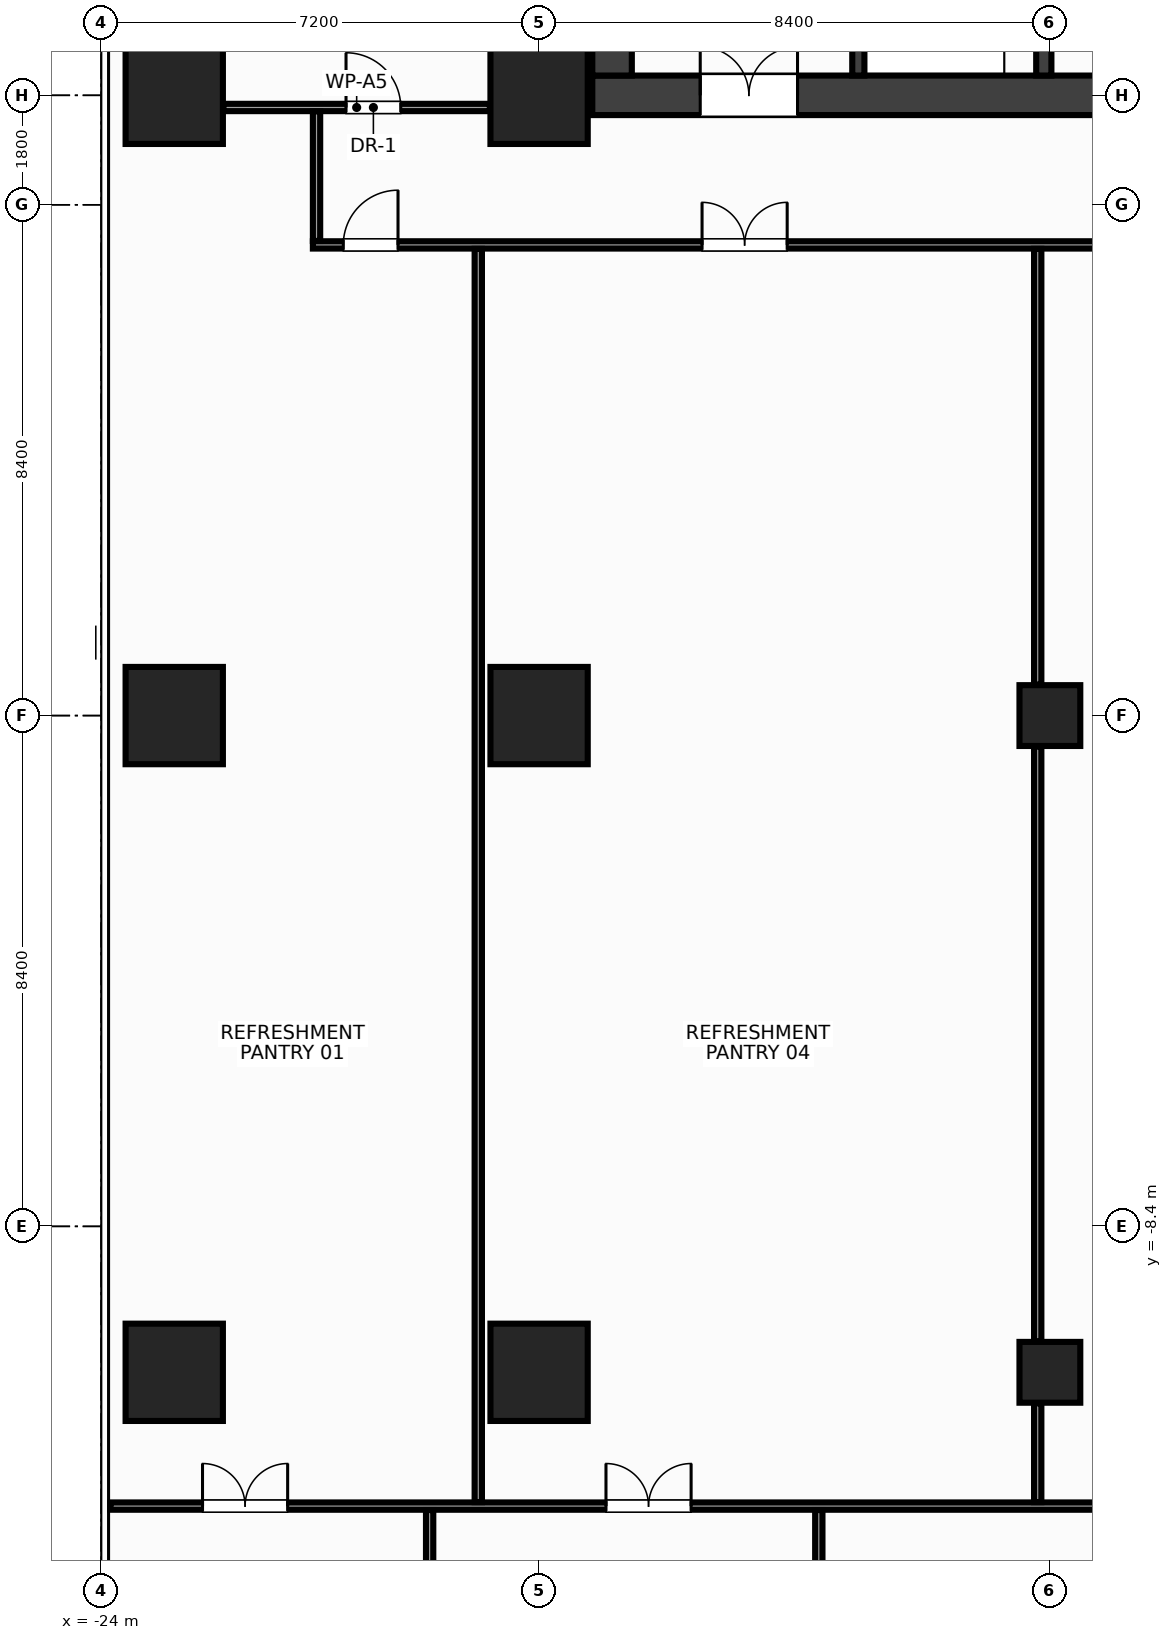
"""IFC4 building model, lengths in metres.
Left out: names, types, materials, properties, quantities, classifications, styles, units other than length and angle.
Written with IfcOpenShell. Run it as: python <this file> out.ifc"""

import sys

from ifc_helpers import new_model, si_unit, direction, frame, frame_2d, origin, origin_2d, place, context, subcontext, project, spatial, rectangle, hollow_rectangle, extrude, source, transform, mapped, element, fill, save


model = new_model("IFC4")
c1 = context("Model", 3, precision=1e-05, world=origin(), true_north=direction((0.0, 1.0)))
c2 = subcontext(c1, "Body", "Model", "MODEL_VIEW")
j1 = project(units=[si_unit("LENGTHUNIT", "METRE"), si_unit("PLANEANGLEUNIT", "RADIAN")], contexts=[c1])
p1 = place(None, origin())
s1 = spatial("IfcSite", under=j1, at=p1, CompositionType="ELEMENT")
p2 = place(p1, origin())
s2 = spatial("IfcBuilding", under=s1, at=p2, CompositionType="ELEMENT")
p3 = place(p2, frame((0.0, 0.0, 178.4)))
s3 = spatial("IfcBuildingStorey", under=s2, at=p3, CompositionType="ELEMENT", Elevation=178.4)
m1 = source(origin(), c2, "Body", "SweptSolid", [
    extrude(rectangle(XDim=31.85, YDim=0.65, at=frame_2d((15.925, 0.0))), origin(), (0.0, 0.0, 1.0), 3.6),
])
p4 = place(p3, frame((-15.925, 10.2, 0.0), z_axis=(0.0, 0.0, 1.0), x_axis=(1.0, 0.0, 0.0)))
e1 = element("IfcWall", 1, at=p4, inside=s3, PredefinedType="SHEAR", context=c2, shape_type="MappedRepresentation", body=[
    mapped(m1, transform((0.0, 0.0, 0.0), x_axis=(1.0, 0.0, 0.0), y_axis=(0.0, 1.0, 0.0), z_axis=(0.0, 0.0, 1.0), scale=1.0)),
])
p5 = place(p4, frame((1.775, 0.0, 0.0)))
e2 = element("IfcOpeningElement", 2, at=p5, cuts=e1, PredefinedType="OPENING", context=c2, shape_type="SweptSolid", body=[
    extrude(rectangle(XDim=1.6, YDim=2.15, at=frame_2d((0.8, 1.075))), frame((0.0, 0.337, 0.0), z_axis=(0.0, -1.0, 0.0), x_axis=(1.0, 0.0, 0.0)), (0.0, 0.0, 1.0), 0.674),
])
p6 = place(p4, frame((28.475, 0.0, 0.0)))
e3 = element("IfcOpeningElement", 3, at=p6, cuts=e1, PredefinedType="OPENING", context=c2, shape_type="SweptSolid", body=[
    extrude(rectangle(XDim=1.6, YDim=2.15, at=frame_2d((0.8, 1.075))), frame((0.0, 0.337, 0.0), z_axis=(0.0, -1.0, 0.0), x_axis=(1.0, 0.0, 0.0)), (0.0, 0.0, 1.0), 0.674),
])
p7 = place(p4, frame((15.175, 0.0, 0.0)))
e4 = element("IfcOpeningElement", 4, at=p7, cuts=e1, PredefinedType="OPENING", context=c2, shape_type="SweptSolid", body=[
    extrude(rectangle(XDim=1.5, YDim=2.2, at=frame_2d((0.75, 1.1))), frame((0.0, 0.337, 0.0), z_axis=(0.0, -1.0, 0.0), x_axis=(1.0, 0.0, 0.0)), (0.0, 0.0, 1.0), 0.674),
])
m2 = source(origin(), c2, "Body", "SweptSolid", [
    extrude(rectangle(XDim=12.95, YDim=0.65, at=frame_2d((6.475, 0.0))), origin(), (0.0, 0.0, 1.0), 3.6),
])
p8 = place(p3, frame((-15.6, 10.525, 0.0), z_axis=(0.0, 0.0, 1.0), x_axis=(0.0, 1.0, 0.0)))
e5 = element("IfcWall", 5, at=p8, inside=s3, PredefinedType="SHEAR", context=c2, shape_type="MappedRepresentation", body=[
    mapped(m2, transform((0.0, 0.0, 0.0), x_axis=(1.0, 0.0, 0.0), y_axis=(0.0, 1.0, 0.0), z_axis=(0.0, 0.0, 1.0), scale=1.0)),
])
m3 = source(origin(), c2, "Body", "SweptSolid", [
    extrude(rectangle(XDim=12.95, YDim=0.25, at=frame_2d((6.475, 0.0))), origin(), (0.0, 0.0, 1.0), 3.6),
])
p9 = place(p3, frame((-8.5, 10.525, 0.0), z_axis=(0.0, 0.0, 1.0), x_axis=(0.0, 1.0, 0.0)))
e6 = element("IfcWall", 6, at=p9, inside=s3, PredefinedType="SHEAR", context=c2, shape_type="MappedRepresentation", body=[
    mapped(m3, transform((0.0, 0.0, 0.0), x_axis=(1.0, 0.0, 0.0), y_axis=(0.0, 1.0, 0.0), z_axis=(0.0, 0.0, 1.0), scale=1.0)),
])
p10 = place(p9, frame((4.145, 0.0, 0.0)))
e7 = element("IfcOpeningElement", 7, at=p10, cuts=e6, PredefinedType="OPENING", context=c2, shape_type="SweptSolid", body=[
    extrude(rectangle(XDim=1.1, YDim=2.15, at=frame_2d((0.55, 1.075))), frame((0.0, 0.137, 0.0), z_axis=(0.0, -1.0, 0.0), x_axis=(1.0, 0.0, 0.0)), (0.0, 0.0, 1.0), 0.274),
])
p11 = place(p9, frame((6.065, 0.0, 0.0)))
e8 = element("IfcOpeningElement", 8, at=p11, cuts=e6, PredefinedType="OPENING", context=c2, shape_type="SweptSolid", body=[
    extrude(rectangle(XDim=1.1, YDim=2.15, at=frame_2d((0.55, 1.075))), frame((0.0, 0.137, 0.0), z_axis=(0.0, -1.0, 0.0), x_axis=(1.0, 0.0, 0.0)), (0.0, 0.0, 1.0), 0.274),
])
p12 = place(p9, frame((7.985, 0.0, 0.0)))
e9 = element("IfcOpeningElement", 9, at=p12, cuts=e6, PredefinedType="OPENING", context=c2, shape_type="SweptSolid", body=[
    extrude(rectangle(XDim=1.1, YDim=2.15, at=frame_2d((0.55, 1.075))), frame((0.0, 0.137, 0.0), z_axis=(0.0, -1.0, 0.0), x_axis=(1.0, 0.0, 0.0)), (0.0, 0.0, 1.0), 0.274),
])
m4 = source(origin(), c2, "Body", "SweptSolid", [
    extrude(rectangle(XDim=3.125, YDim=0.2, at=frame_2d((1.562, 0.0))), origin(), (0.0, 0.0, 1.0), 3.6),
])
p13 = place(p3, frame((-11.55, 10.525, 0.0), z_axis=(0.0, 0.0, 1.0), x_axis=(0.0, 1.0, 0.0)))
e10 = element("IfcWall", 10, at=p13, inside=s3, PredefinedType="SHEAR", context=c2, shape_type="MappedRepresentation", body=[
    mapped(m4, transform((0.0, 0.0, 0.0), x_axis=(1.0, 0.0, 0.0), y_axis=(0.0, 1.0, 0.0), z_axis=(0.0, 0.0, 1.0), scale=1.0)),
])
p14 = place(p13, frame((0.9, 0.0, 0.0)))
e11 = element("IfcOpeningElement", 11, at=p14, cuts=e10, PredefinedType="OPENING", context=c2, shape_type="SweptSolid", body=[
    extrude(rectangle(XDim=1.1, YDim=2.15, at=frame_2d((0.55, 1.075))), frame((0.0, 0.112, 0.0), z_axis=(0.0, -1.0, 0.0), x_axis=(1.0, 0.0, 0.0)), (0.0, 0.0, 1.0), 0.224),
])
m5 = source(origin(), c2, "Body", "SweptSolid", [
    extrude(rectangle(XDim=1.6, YDim=1.6, at=origin_2d()), origin(), (0.0, 0.0, 1.0), 3.6),
])
for number, where, z_axis, x_axis in (
    (12, (-16.8, -10.8, 0.0), (0.0, 0.0, 1.0), (1.0, 0.0, 0.0)),
    (13, (-16.8, 0.0, 0.0), (0.0, 0.0, 1.0), (1.0, 0.0, 0.0)),
    (14, (-16.8, 10.2, 0.0), (0.0, 0.0, 1.0), (1.0, 0.0, 0.0)),
    (15, (-22.8, -10.8, 0.0), (0.0, 0.0, 1.0), (1.0, 0.0, 0.0)),
    (16, (-22.8, 0.0, 0.0), (0.0, 0.0, 1.0), (1.0, 0.0, 0.0)),
    (17, (-22.8, 10.2, 0.0), (0.0, 0.0, 1.0), (1.0, 0.0, 0.0)),
):
    element("IfcColumn", number, at=place(p3, frame(where, z_axis=z_axis, x_axis=x_axis)), inside=s3, PredefinedType="COLUMN", context=c2, shape_type="MappedRepresentation", body=[
        mapped(m5, transform((0.0, 0.0, 0.0), x_axis=(1.0, 0.0, 0.0), y_axis=(0.0, 1.0, 0.0), z_axis=(0.0, 0.0, 1.0), scale=1.0)),
    ])
m6 = source(origin(), c2, "Body", "SweptSolid", [
    extrude(hollow_rectangle(XDim=1.0, YDim=1.0, WallThickness=0.045, at=origin_2d()), origin(), (0.0, 0.0, 1.0), 3.6),
])
for number, where, z_axis, x_axis in (
    (18, (-8.4, 0.0, 0.0), (0.0, 0.0, 1.0), (1.0, 0.0, 0.0)),
    (19, (-8.4, -10.8, 0.0), (0.0, 0.0, 1.0), (1.0, 0.0, 0.0)),
):
    element("IfcColumn", number, at=place(p3, frame(where, z_axis=z_axis, x_axis=x_axis)), inside=s3, PredefinedType="COLUMN", context=c2, shape_type="MappedRepresentation", body=[
        mapped(m6, transform((0.0, 0.0, 0.0), x_axis=(1.0, 0.0, 0.0), y_axis=(0.0, 1.0, 0.0), z_axis=(0.0, 0.0, 1.0), scale=1.0)),
    ])
m7 = source(origin(), c2, "Body", "SweptSolid", [
    extrude(rectangle(XDim=4.38, YDim=0.12, at=frame_2d((2.19, 0.0))), origin(), (0.0, 0.0, 1.0), 2.915),
])
p15 = place(p3, frame((-21.99, 10.0, 0.0), z_axis=(0.0, 0.0, 1.0), x_axis=(1.0, 0.0, 0.0)))
e20 = element("IfcWall", 20, at=p15, inside=s3, PredefinedType="PARTITIONING", context=c2, shape_type="MappedRepresentation", body=[
    mapped(m7, transform((0.0, 0.0, 0.0), x_axis=(1.0, 0.0, 0.0), y_axis=(0.0, 1.0, 0.0), z_axis=(0.0, 0.0, 1.0), scale=1.0)),
])
p16 = place(p15, frame((2.015, 0.0, 0.0)))
e21 = element("IfcOpeningElement", 21, at=p16, cuts=e20, PredefinedType="OPENING", context=c2, shape_type="SweptSolid", body=[
    extrude(rectangle(XDim=0.9, YDim=2.15, at=frame_2d((0.45, 1.075))), frame((0.0, 0.072, 0.0), z_axis=(0.0, -1.0, 0.0), x_axis=(1.0, 0.0, 0.0)), (0.0, 0.0, 1.0), 0.144),
])
m8 = source(origin(), c2, "Body", "SweptSolid", [
    extrude(rectangle(XDim=31.6, YDim=0.12, at=frame_2d((15.8, 0.0))), origin(), (0.0, 0.0, 1.0), 2.765),
])
p17 = place(p3, frame((-20.52, 7.74, 0.0), z_axis=(0.0, 0.0, 1.0), x_axis=(1.0, 0.0, 0.0)))
e22 = element("IfcWall", 22, at=p17, inside=s3, PredefinedType="PARTITIONING", context=c2, shape_type="MappedRepresentation", body=[
    mapped(m8, transform((0.0, 0.0, 0.0), x_axis=(1.0, 0.0, 0.0), y_axis=(0.0, 1.0, 0.0), z_axis=(0.0, 0.0, 1.0), scale=1.0)),
])
p18 = place(p17, frame((0.5, 0.0, 0.0)))
e23 = element("IfcOpeningElement", 23, at=p18, cuts=e22, PredefinedType="OPENING", context=c2, shape_type="SweptSolid", body=[
    extrude(rectangle(XDim=0.9, YDim=2.15, at=frame_2d((0.45, 1.075))), frame((0.0, 0.072, 0.0), z_axis=(0.0, -1.0, 0.0), x_axis=(1.0, 0.0, 0.0)), (0.0, 0.0, 1.0), 0.144),
])
p19 = place(p17, frame((6.4, 0.0, 0.0)))
e24 = element("IfcOpeningElement", 24, at=p19, cuts=e22, PredefinedType="OPENING", context=c2, shape_type="SweptSolid", body=[
    extrude(rectangle(XDim=1.4, YDim=2.2, at=frame_2d((0.7, 1.1))), frame((0.0, 0.072, 0.0), z_axis=(0.0, -1.0, 0.0), x_axis=(1.0, 0.0, 0.0)), (0.0, 0.0, 1.0), 0.144),
])
p20 = place(p17, frame((15.52, 0.0, 0.0)))
e25 = element("IfcOpeningElement", 25, at=p20, cuts=e22, PredefinedType="OPENING", context=c2, shape_type="SweptSolid", body=[
    extrude(rectangle(XDim=1.4, YDim=2.2, at=frame_2d((0.7, 1.1))), frame((0.0, 0.072, 0.0), z_axis=(0.0, -1.0, 0.0), x_axis=(1.0, 0.0, 0.0)), (0.0, 0.0, 1.0), 0.144),
])
p21 = place(p17, frame((24.12, 0.0, 0.0)))
e26 = element("IfcOpeningElement", 26, at=p21, cuts=e22, PredefinedType="OPENING", context=c2, shape_type="SweptSolid", body=[
    extrude(rectangle(XDim=1.4, YDim=2.2, at=frame_2d((0.7, 1.1))), frame((0.0, 0.072, 0.0), z_axis=(0.0, -1.0, 0.0), x_axis=(1.0, 0.0, 0.0)), (0.0, 0.0, 1.0), 0.144),
])
p22 = place(p17, frame((29.63, 0.0, 0.0)))
e27 = element("IfcOpeningElement", 27, at=p22, cuts=e22, PredefinedType="OPENING", context=c2, shape_type="SweptSolid", body=[
    extrude(rectangle(XDim=1.4, YDim=2.2, at=frame_2d((0.7, 1.1))), frame((0.0, 0.072, 0.0), z_axis=(0.0, -1.0, 0.0), x_axis=(1.0, 0.0, 0.0)), (0.0, 0.0, 1.0), 0.144),
])
m9 = source(origin(), c2, "Body", "SweptSolid", [
    extrude(rectangle(XDim=2.13, YDim=0.12, at=frame_2d((1.065, 0.0))), origin(), (0.0, 0.0, 1.0), 3.38),
])
p23 = place(p3, frame((-20.46, 7.805, 0.0), z_axis=(0.0, 0.0, 1.0), x_axis=(0.0, 1.0, 0.0)))
e28 = element("IfcWall", 28, at=p23, inside=s3, PredefinedType="PARTITIONING", context=c2, shape_type="MappedRepresentation", body=[
    mapped(m9, transform((0.0, 0.0, 0.0), x_axis=(1.0, 0.0, 0.0), y_axis=(0.0, 1.0, 0.0), z_axis=(0.0, 0.0, 1.0), scale=1.0)),
])
m10 = source(origin(), c2, "Body", "SweptSolid", [
    extrude(rectangle(XDim=34.925, YDim=0.12, at=frame_2d((17.462, 0.0))), origin(), (0.0, 0.0, 1.0), 2.965),
])
p24 = place(p3, frame((-23.85, -13.0, 0.0), z_axis=(0.0, 0.0, 1.0), x_axis=(1.0, 0.0, 0.0)))
e29 = element("IfcWall", 29, at=p24, inside=s3, PredefinedType="PARTITIONING", context=c2, shape_type="MappedRepresentation", body=[
    mapped(m10, transform((0.0, 0.0, 0.0), x_axis=(1.0, 0.0, 0.0), y_axis=(0.0, 1.0, 0.0), z_axis=(0.0, 0.0, 1.0), scale=1.0)),
])
p25 = place(p24, frame((1.515, 0.0, 0.0)))
e30 = element("IfcOpeningElement", 30, at=p25, cuts=e29, PredefinedType="OPENING", context=c2, shape_type="SweptSolid", body=[
    extrude(rectangle(XDim=1.4, YDim=2.2, at=frame_2d((0.7, 1.1))), frame((0.0, 0.072, 0.0), z_axis=(0.0, -1.0, 0.0), x_axis=(1.0, 0.0, 0.0)), (0.0, 0.0, 1.0), 0.144),
])
p26 = place(p24, frame((8.15, 0.0, 0.0)))
e31 = element("IfcOpeningElement", 31, at=p26, cuts=e29, PredefinedType="OPENING", context=c2, shape_type="SweptSolid", body=[
    extrude(rectangle(XDim=1.4, YDim=2.2, at=frame_2d((0.7, 1.1))), frame((0.0, 0.072, 0.0), z_axis=(0.0, -1.0, 0.0), x_axis=(1.0, 0.0, 0.0)), (0.0, 0.0, 1.0), 0.144),
])
m11 = source(origin(), c2, "Body", "SweptSolid", [
    extrude(rectangle(XDim=20.61, YDim=0.12, at=frame_2d((10.305, 0.0))), origin(), (0.0, 0.0, 1.0), 2.915),
])
p27 = place(p3, frame((-17.8, -12.935, 0.0), z_axis=(0.0, 0.0, 1.0), x_axis=(0.0, 1.0, 0.0)))
e32 = element("IfcWall", 32, at=p27, inside=s3, PredefinedType="PARTITIONING", context=c2, shape_type="MappedRepresentation", body=[
    mapped(m11, transform((0.0, 0.0, 0.0), x_axis=(1.0, 0.0, 0.0), y_axis=(0.0, 1.0, 0.0), z_axis=(0.0, 0.0, 1.0), scale=1.0)),
])
m12 = source(origin(), c2, "Body", "SweptSolid", [
    extrude(rectangle(XDim=1.625, YDim=0.12, at=frame_2d((0.812, 0.0))), origin(), (0.0, 0.0, 1.0), 2.965),
])
p28 = place(p3, frame((-8.6, -12.935, 0.0), z_axis=(0.0, 0.0, 1.0), x_axis=(0.0, 1.0, 0.0)))
e33 = element("IfcWall", 33, at=p28, inside=s3, PredefinedType="PARTITIONING", context=c2, shape_type="MappedRepresentation", body=[
    mapped(m12, transform((0.0, 0.0, 0.0), x_axis=(1.0, 0.0, 0.0), y_axis=(0.0, 1.0, 0.0), z_axis=(0.0, 0.0, 1.0), scale=1.0)),
])
m13 = source(origin(), c2, "Body", "SweptSolid", [
    extrude(rectangle(XDim=9.78, YDim=0.12, at=frame_2d((4.89, 0.0))), origin(), (0.0, 0.0, 1.0), 2.765),
])
p29 = place(p3, frame((-8.6, -10.29, 0.0), z_axis=(0.0, 0.0, 1.0), x_axis=(0.0, 1.0, 0.0)))
e34 = element("IfcWall", 34, at=p29, inside=s3, PredefinedType="PARTITIONING", context=c2, shape_type="MappedRepresentation", body=[
    mapped(m13, transform((0.0, 0.0, 0.0), x_axis=(1.0, 0.0, 0.0), y_axis=(0.0, 1.0, 0.0), z_axis=(0.0, 0.0, 1.0), scale=1.0)),
])
m14 = source(origin(), c2, "Body", "SweptSolid", [
    extrude(rectangle(XDim=7.165, YDim=0.12, at=frame_2d((3.583, 0.0))), origin(), (0.0, 0.0, 1.0), 2.665),
])
p30 = place(p3, frame((-8.6, 0.51, 0.0), z_axis=(0.0, 0.0, 1.0), x_axis=(0.0, 1.0, 0.0)))
e35 = element("IfcWall", 35, at=p30, inside=s3, PredefinedType="PARTITIONING", context=c2, shape_type="MappedRepresentation", body=[
    mapped(m14, transform((0.0, 0.0, 0.0), x_axis=(1.0, 0.0, 0.0), y_axis=(0.0, 1.0, 0.0), z_axis=(0.0, 0.0, 1.0), scale=1.0)),
])
m15 = source(origin(), c2, "Body", "SweptSolid", [
    extrude(rectangle(XDim=4.597, YDim=0.12, at=frame_2d((2.299, 0.0))), origin(), (0.0, 0.0, 1.0), 3.38),
])
p31 = place(p3, frame((-18.6, -17.662, 0.0), z_axis=(0.0, 0.0, 1.0), x_axis=(0.0, 1.0, 0.0)))
e36 = element("IfcWall", 36, at=p31, inside=s3, PredefinedType="PARTITIONING", context=c2, shape_type="MappedRepresentation", body=[
    mapped(m15, transform((0.0, 0.0, 0.0), x_axis=(1.0, 0.0, 0.0), y_axis=(0.0, 1.0, 0.0), z_axis=(0.0, 0.0, 1.0), scale=1.0)),
])
m16 = source(origin(), c2, "Body", "SweptSolid", [
    extrude(rectangle(XDim=9.585, YDim=0.12, at=frame_2d((4.792, 0.0))), origin(), (0.0, 0.0, 1.0), 2.915),
])
p32 = place(p3, frame((-12.2, -22.65, 0.0), z_axis=(0.0, 0.0, 1.0), x_axis=(0.0, 1.0, 0.0)))
e37 = element("IfcWall", 37, at=p32, inside=s3, PredefinedType="PARTITIONING", context=c2, shape_type="MappedRepresentation", body=[
    mapped(m16, transform((0.0, 0.0, 0.0), x_axis=(1.0, 0.0, 0.0), y_axis=(0.0, 1.0, 0.0), z_axis=(0.0, 0.0, 1.0), scale=1.0)),
])
m17 = source(origin(), c2, "Body", "SweptSolid", [
    extrude(rectangle(XDim=1.6, YDim=2.15, at=frame_2d((0.8, 1.075))), frame((0.0, 0.025, 0.0), z_axis=(0.0, -1.0, 0.0), x_axis=(1.0, 0.0, 0.0)), (0.0, 0.0, 1.0), 0.05),
])
p33 = place(p5, origin())
e38 = element("IfcDoor", 38, at=p33, inside=s3, OperationType="DOUBLE_DOOR_SINGLE_SWING", PredefinedType="DOOR", context=c2, shape_type="MappedRepresentation", body=[
    mapped(m17, transform((0.0, 0.0, 0.0), x_axis=(1.0, 0.0, 0.0), y_axis=(0.0, 1.0, 0.0), z_axis=(0.0, 0.0, 1.0), scale=1.0)),
])
fill(e2, e38)
m18 = source(origin(), c2, "Body", "SweptSolid", [
    extrude(rectangle(XDim=0.9, YDim=2.15, at=frame_2d((0.45, 1.075))), frame((0.0, 0.025, 0.0), z_axis=(0.0, -1.0, 0.0), x_axis=(1.0, 0.0, 0.0)), (0.0, 0.0, 1.0), 0.05),
])
p34 = place(p16, origin())
e39 = element("IfcDoor", 39, at=p34, inside=s3, OperationType="SINGLE_SWING_LEFT", PredefinedType="DOOR", context=c2, shape_type="MappedRepresentation", body=[
    mapped(m18, transform((0.0, 0.0, 0.0), x_axis=(1.0, 0.0, 0.0), y_axis=(0.0, 1.0, 0.0), z_axis=(0.0, 0.0, 1.0), scale=1.0)),
])
fill(e21, e39)
p35 = place(p18, origin())
e40 = element("IfcDoor", 40, at=p35, inside=s3, OperationType="SINGLE_SWING_RIGHT", PredefinedType="DOOR", context=c2, shape_type="MappedRepresentation", body=[
    mapped(m18, transform((0.0, 0.0, 0.0), x_axis=(1.0, 0.0, 0.0), y_axis=(0.0, 1.0, 0.0), z_axis=(0.0, 0.0, 1.0), scale=1.0)),
])
fill(e23, e40)
m19 = source(origin(), c2, "Body", "SweptSolid", [
    extrude(rectangle(XDim=1.4, YDim=2.2, at=frame_2d((0.7, 1.1))), frame((0.0, 0.025, 0.0), z_axis=(0.0, -1.0, 0.0), x_axis=(1.0, 0.0, 0.0)), (0.0, 0.0, 1.0), 0.05),
])
p36 = place(p19, origin())
e41 = element("IfcDoor", 41, at=p36, inside=s3, OperationType="DOUBLE_DOOR_SINGLE_SWING", PredefinedType="DOOR", context=c2, shape_type="MappedRepresentation", body=[
    mapped(m19, transform((0.0, 0.0, 0.0), x_axis=(1.0, 0.0, 0.0), y_axis=(0.0, 1.0, 0.0), z_axis=(0.0, 0.0, 1.0), scale=1.0)),
])
fill(e24, e41)
p37 = place(p25, origin())
e42 = element("IfcDoor", 42, at=p37, inside=s3, OperationType="DOUBLE_DOOR_SINGLE_SWING", PredefinedType="DOOR", context=c2, shape_type="MappedRepresentation", body=[
    mapped(m19, transform((0.0, 0.0, 0.0), x_axis=(1.0, 0.0, 0.0), y_axis=(0.0, 1.0, 0.0), z_axis=(0.0, 0.0, 1.0), scale=1.0)),
])
fill(e30, e42)
p38 = place(p26, origin())
e43 = element("IfcDoor", 43, at=p38, inside=s3, OperationType="DOUBLE_DOOR_SINGLE_SWING", PredefinedType="DOOR", context=c2, shape_type="MappedRepresentation", body=[
    mapped(m19, transform((0.0, 0.0, 0.0), x_axis=(1.0, 0.0, 0.0), y_axis=(0.0, 1.0, 0.0), z_axis=(0.0, 0.0, 1.0), scale=1.0)),
])
fill(e31, e43)
save(model, sys.argv[1])
